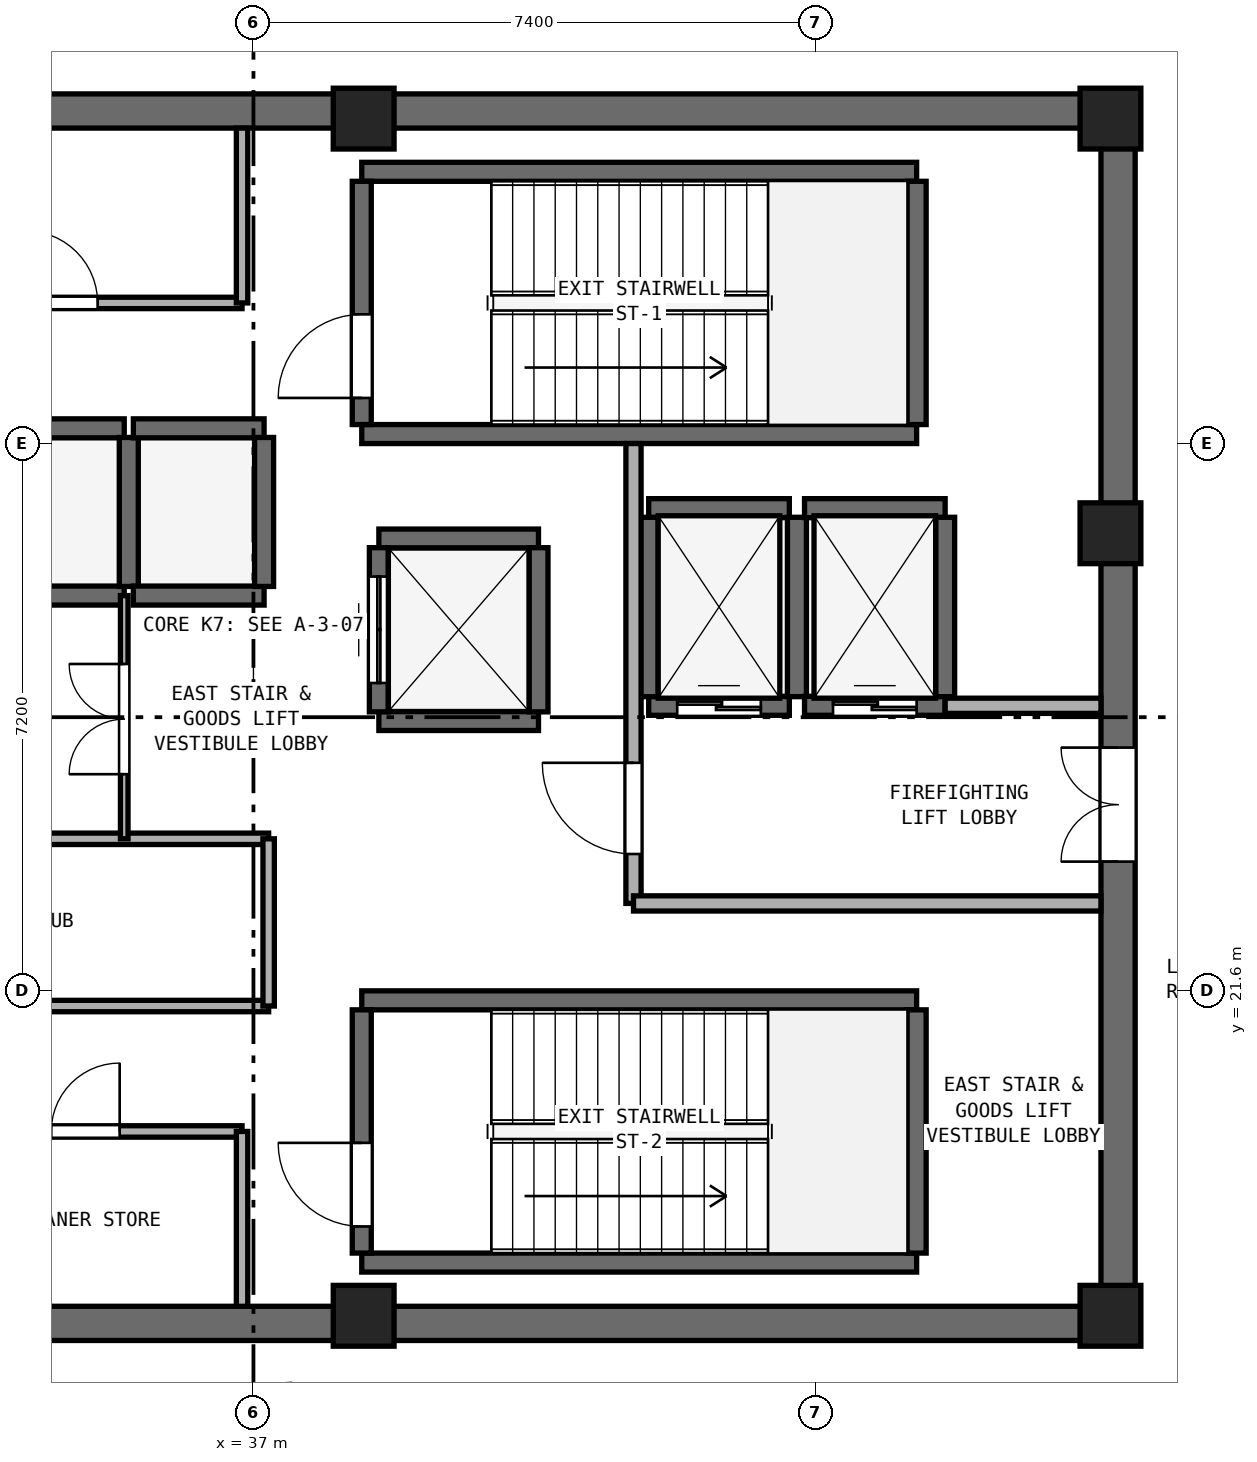
"""IFC4 building model, lengths in metres.
Left out: names, types, materials, properties, quantities, classifications, styles, units other than length and angle.
Written with IfcOpenShell. Run it as: python <this file> out.ifc"""

import sys

from ifc_helpers import new_model, si_unit, direction, frame, frame_2d, origin, origin_2d, place, context, subcontext, project, spatial, rectangle, extrude, element, fill, save


model = new_model("IFC4")
c1 = context("Model", 3, precision=1e-05, world=origin(), true_north=direction((0.0, 1.0)))
c2 = subcontext(c1, "Body", "Model", "MODEL_VIEW")
j1 = project(units=[si_unit("LENGTHUNIT", "METRE"), si_unit("PLANEANGLEUNIT", "RADIAN")], contexts=[c1])
p1 = place(None, origin())
s1 = spatial("IfcSite", under=j1, at=p1, CompositionType="ELEMENT")
p2 = place(p1, origin())
s2 = spatial("IfcBuilding", under=s1, at=p2, CompositionType="ELEMENT")
p3 = place(p2, frame((0.0, 0.0, 308.6)))
s3 = spatial("IfcBuildingStorey", under=s2, at=p3, CompositionType="ELEMENT", Elevation=308.6)
for number, where, z_axis, x_axis in (
    (1, (25.4, 17.225, 0.0), (0.0, 0.0, 1.0), (1.0, 0.0, 0.0)),
    (2, (25.4, 33.175, 0.0), (0.0, 0.0, 1.0), (1.0, 0.0, 0.0)),
):
    element("IfcWall", number, at=place(p3, frame(where, z_axis=z_axis, x_axis=x_axis)), inside=s3, PredefinedType="SHEAR", context=c2, shape_type="SweptSolid", body=[
        extrude(rectangle(XDim=23.2, YDim=0.45, at=frame_2d((11.6, 0.0))), origin(), (0.0, 0.0, 1.0), 4.52),
    ])
p4 = place(p3, frame((48.375, 17.45, 0.0), z_axis=(0.0, 0.0, 1.0), x_axis=(0.0, 1.0, 0.0)))
e3 = element("IfcWall", 3, at=p4, inside=s3, PredefinedType="SHEAR", context=c2, shape_type="SweptSolid", body=[
    extrude(rectangle(XDim=15.5, YDim=0.45, at=frame_2d((7.75, 0.0))), origin(), (0.0, 0.0, 1.0), 4.52),
])
p5 = place(p4, frame((5.85, 0.0, 0.0)))
e4 = element("IfcOpeningElement", 4, at=p5, cuts=e3, PredefinedType="OPENING", context=c2, shape_type="SweptSolid", body=[
    extrude(rectangle(XDim=1.5, YDim=2.15, at=frame_2d((0.75, 1.075))), frame((0.0, 0.235, 0.0), z_axis=(0.0, -1.0, 0.0), x_axis=(1.0, 0.0, 0.0)), (0.0, 0.0, 1.0), 0.47),
])
for number, where, z_axis, x_axis in (
    (5, (38.45, 17.325, 0.0), (0.0, 0.0, 1.0), (1.0, 0.0, 0.0)),
    (6, (48.275, 17.325, 0.0), (0.0, 0.0, 1.0), (1.0, 0.0, 0.0)),
    (7, (48.275, 27.62, 0.0), (0.0, 0.0, 1.0), (1.0, 0.0, 0.0)),
    (8, (48.275, 33.075, 0.0), (0.0, 0.0, 1.0), (1.0, 0.0, 0.0)),
    (9, (38.45, 33.075, 0.0), (0.0, 0.0, 1.0), (1.0, 0.0, 0.0)),
):
    element("IfcColumn", number, at=place(p3, frame(where, z_axis=z_axis, x_axis=x_axis)), inside=s3, PredefinedType="PILASTER", context=c2, shape_type="SweptSolid", body=[
        extrude(rectangle(XDim=0.8, YDim=0.8, at=origin_2d()), origin(), (0.0, 0.0, 1.0), 4.8),
    ])
for number, where, z_axis, x_axis in (
    (10, (38.425, 28.925, 0.0), (0.0, 0.0, 1.0), (1.0, 0.0, 0.0)),
    (11, (38.425, 32.375, 0.0), (0.0, 0.0, 1.0), (1.0, 0.0, 0.0)),
):
    element("IfcWall", number, at=place(p3, frame(where, z_axis=z_axis, x_axis=x_axis)), inside=s3, PredefinedType="SHEAR", context=c2, shape_type="SweptSolid", body=[
        extrude(rectangle(XDim=7.3, YDim=0.25, at=frame_2d((3.65, 0.0))), origin(), (0.0, 0.0, 1.0), 4.52),
    ])
p6 = place(p3, frame((38.425, 29.05, 0.0), z_axis=(0.0, 0.0, 1.0), x_axis=(0.0, 1.0, 0.0)))
e12 = element("IfcWall", 12, at=p6, inside=s3, PredefinedType="SHEAR", context=c2, shape_type="SweptSolid", body=[
    extrude(rectangle(XDim=3.2, YDim=0.25, at=frame_2d((1.6, 0.0))), origin(), (0.0, 0.0, 1.0), 4.52),
])
p7 = place(p6, frame((0.35, 0.0, 0.0)))
e13 = element("IfcOpeningElement", 13, at=p7, cuts=e12, PredefinedType="OPENING", context=c2, shape_type="SweptSolid", body=[
    extrude(rectangle(XDim=1.1, YDim=2.15, at=frame_2d((0.55, 1.075))), frame((0.0, 0.135, 0.0), z_axis=(0.0, -1.0, 0.0), x_axis=(1.0, 0.0, 0.0)), (0.0, 0.0, 1.0), 0.27),
])
p8 = place(p3, frame((45.725, 29.05, 0.0), z_axis=(0.0, 0.0, 1.0), x_axis=(0.0, 1.0, 0.0)))
e14 = element("IfcWall", 14, at=p8, inside=s3, PredefinedType="SHEAR", context=c2, shape_type="SweptSolid", body=[
    extrude(rectangle(XDim=3.2, YDim=0.25, at=frame_2d((1.6, 0.0))), origin(), (0.0, 0.0, 1.0), 4.52),
])
for number, where, z_axis, x_axis in (
    (15, (38.425, 18.025, 0.0), (0.0, 0.0, 1.0), (1.0, 0.0, 0.0)),
    (16, (38.425, 21.475, 0.0), (0.0, 0.0, 1.0), (1.0, 0.0, 0.0)),
):
    element("IfcWall", number, at=place(p3, frame(where, z_axis=z_axis, x_axis=x_axis)), inside=s3, PredefinedType="SHEAR", context=c2, shape_type="SweptSolid", body=[
        extrude(rectangle(XDim=7.3, YDim=0.25, at=frame_2d((3.65, 0.0))), origin(), (0.0, 0.0, 1.0), 4.52),
    ])
p9 = place(p3, frame((38.425, 18.15, 0.0), z_axis=(0.0, 0.0, 1.0), x_axis=(0.0, 1.0, 0.0)))
e17 = element("IfcWall", 17, at=p9, inside=s3, PredefinedType="SHEAR", context=c2, shape_type="SweptSolid", body=[
    extrude(rectangle(XDim=3.2, YDim=0.25, at=frame_2d((1.6, 0.0))), origin(), (0.0, 0.0, 1.0), 4.52),
])
p10 = place(p9, frame((0.35, 0.0, 0.0)))
e18 = element("IfcOpeningElement", 18, at=p10, cuts=e17, PredefinedType="OPENING", context=c2, shape_type="SweptSolid", body=[
    extrude(rectangle(XDim=1.1, YDim=2.15, at=frame_2d((0.55, 1.075))), frame((0.0, 0.135, 0.0), z_axis=(0.0, -1.0, 0.0), x_axis=(1.0, 0.0, 0.0)), (0.0, 0.0, 1.0), 0.27),
])
p11 = place(p3, frame((45.725, 18.15, 0.0), z_axis=(0.0, 0.0, 1.0), x_axis=(0.0, 1.0, 0.0)))
e19 = element("IfcWall", 19, at=p11, inside=s3, PredefinedType="SHEAR", context=c2, shape_type="SweptSolid", body=[
    extrude(rectangle(XDim=3.2, YDim=0.25, at=frame_2d((1.6, 0.0))), origin(), (0.0, 0.0, 1.0), 4.52),
])
for number, where, z_axis, x_axis in (
    (20, (33.58, 26.8, 0.0), (0.0, 0.0, 1.0), (1.0, 0.0, 0.0)),
    (21, (33.58, 29.0, 0.0), (0.0, 0.0, 1.0), (1.0, 0.0, 0.0)),
):
    element("IfcWall", number, at=place(p3, frame(where, z_axis=z_axis, x_axis=x_axis)), inside=s3, PredefinedType="SHEAR", context=c2, shape_type="SweptSolid", body=[
        extrude(rectangle(XDim=1.72, YDim=0.25, at=frame_2d((0.86, 0.0))), origin(), (0.0, 0.0, 1.0), 4.52),
    ])
p12 = place(p3, frame((35.36, 26.92, 0.0), z_axis=(0.0, 0.0, 1.0), x_axis=(0.0, 1.0, 0.0)))
e22 = element("IfcWall", 22, at=p12, inside=s3, PredefinedType="SHEAR", context=c2, shape_type="SweptSolid", body=[
    extrude(rectangle(XDim=1.96, YDim=0.25, at=frame_2d((0.98, 0.0))), origin(), (0.0, 0.0, 1.0), 4.52),
])
for number, where, z_axis, x_axis in (
    (23, (35.42, 26.8, 0.0), (0.0, 0.0, 1.0), (1.0, 0.0, 0.0)),
    (24, (35.42, 29.0, 0.0), (0.0, 0.0, 1.0), (1.0, 0.0, 0.0)),
):
    element("IfcWall", number, at=place(p3, frame(where, z_axis=z_axis, x_axis=x_axis)), inside=s3, PredefinedType="SHEAR", context=c2, shape_type="SweptSolid", body=[
        extrude(rectangle(XDim=1.72, YDim=0.25, at=frame_2d((0.86, 0.0))), origin(), (0.0, 0.0, 1.0), 4.52),
    ])
p13 = place(p3, frame((37.14, 26.92, 0.0), z_axis=(0.0, 0.0, 1.0), x_axis=(0.0, 1.0, 0.0)))
e25 = element("IfcWall", 25, at=p13, inside=s3, PredefinedType="SHEAR", context=c2, shape_type="SweptSolid", body=[
    extrude(rectangle(XDim=1.96, YDim=0.25, at=frame_2d((0.98, 0.0))), origin(), (0.0, 0.0, 1.0), 4.52),
])
p14 = place(p3, frame((42.2, 25.35, 0.0), z_axis=(0.0, 0.0, 1.0), x_axis=(1.0, 0.0, 0.0)))
e26 = element("IfcWall", 26, at=p14, inside=s3, PredefinedType="SHEAR", context=c2, shape_type="SweptSolid", body=[
    extrude(rectangle(XDim=1.85, YDim=0.25, at=frame_2d((0.925, 0.0))), origin(), (0.0, 0.0, 1.0), 4.52),
])
p15 = place(p14, frame((0.375, 0.0, 0.0)))
e27 = element("IfcOpeningElement", 27, at=p15, cuts=e26, PredefinedType="OPENING", context=c2, shape_type="SweptSolid", body=[
    extrude(rectangle(XDim=1.1, YDim=2.15, at=frame_2d((0.55, 1.075))), frame((0.0, 0.135, 0.0), z_axis=(0.0, -1.0, 0.0), x_axis=(1.0, 0.0, 0.0)), (0.0, 0.0, 1.0), 0.27),
])
p16 = place(p3, frame((42.2, 27.95, 0.0), z_axis=(0.0, 0.0, 1.0), x_axis=(1.0, 0.0, 0.0)))
e28 = element("IfcWall", 28, at=p16, inside=s3, PredefinedType="SHEAR", context=c2, shape_type="SweptSolid", body=[
    extrude(rectangle(XDim=1.85, YDim=0.25, at=frame_2d((0.925, 0.0))), origin(), (0.0, 0.0, 1.0), 4.52),
])
for number, where, z_axis, x_axis in (
    (29, (42.2, 25.47, 0.0), (0.0, 0.0, 1.0), (0.0, 1.0, 0.0)),
    (30, (44.15, 25.47, 0.0), (0.0, 0.0, 1.0), (0.0, 1.0, 0.0)),
):
    element("IfcWall", number, at=place(p3, frame(where, z_axis=z_axis, x_axis=x_axis)), inside=s3, PredefinedType="SHEAR", context=c2, shape_type="SweptSolid", body=[
        extrude(rectangle(XDim=2.36, YDim=0.25, at=frame_2d((1.18, 0.0))), origin(), (0.0, 0.0, 1.0), 4.52),
    ])
p17 = place(p3, frame((44.25, 25.35, 0.0), z_axis=(0.0, 0.0, 1.0), x_axis=(1.0, 0.0, 0.0)))
e31 = element("IfcWall", 31, at=p17, inside=s3, PredefinedType="SHEAR", context=c2, shape_type="SweptSolid", body=[
    extrude(rectangle(XDim=1.85, YDim=0.25, at=frame_2d((0.925, 0.0))), origin(), (0.0, 0.0, 1.0), 4.52),
])
p18 = place(p17, frame((0.375, 0.0, 0.0)))
e32 = element("IfcOpeningElement", 32, at=p18, cuts=e31, PredefinedType="OPENING", context=c2, shape_type="SweptSolid", body=[
    extrude(rectangle(XDim=1.1, YDim=2.15, at=frame_2d((0.55, 1.075))), frame((0.0, 0.135, 0.0), z_axis=(0.0, -1.0, 0.0), x_axis=(1.0, 0.0, 0.0)), (0.0, 0.0, 1.0), 0.27),
])
p19 = place(p3, frame((44.25, 27.95, 0.0), z_axis=(0.0, 0.0, 1.0), x_axis=(1.0, 0.0, 0.0)))
e33 = element("IfcWall", 33, at=p19, inside=s3, PredefinedType="SHEAR", context=c2, shape_type="SweptSolid", body=[
    extrude(rectangle(XDim=1.85, YDim=0.25, at=frame_2d((0.925, 0.0))), origin(), (0.0, 0.0, 1.0), 4.52),
])
p20 = place(p3, frame((46.1, 25.47, 0.0), z_axis=(0.0, 0.0, 1.0), x_axis=(0.0, 1.0, 0.0)))
e34 = element("IfcWall", 34, at=p20, inside=s3, PredefinedType="SHEAR", context=c2, shape_type="SweptSolid", body=[
    extrude(rectangle(XDim=2.36, YDim=0.25, at=frame_2d((1.18, 0.0))), origin(), (0.0, 0.0, 1.0), 4.52),
])
for number, where, z_axis, x_axis in (
    (35, (38.65, 25.15, 0.0), (0.0, 0.0, 1.0), (1.0, 0.0, 0.0)),
    (36, (38.65, 27.55, 0.0), (0.0, 0.0, 1.0), (1.0, 0.0, 0.0)),
):
    element("IfcWall", number, at=place(p3, frame(where, z_axis=z_axis, x_axis=x_axis)), inside=s3, PredefinedType="SHEAR", context=c2, shape_type="SweptSolid", body=[
        extrude(rectangle(XDim=2.1, YDim=0.25, at=frame_2d((1.05, 0.0))), origin(), (0.0, 0.0, 1.0), 4.52),
    ])
p21 = place(p3, frame((38.65, 25.27, 0.0), z_axis=(0.0, 0.0, 1.0), x_axis=(0.0, 1.0, 0.0)))
e37 = element("IfcWall", 37, at=p21, inside=s3, PredefinedType="SHEAR", context=c2, shape_type="SweptSolid", body=[
    extrude(rectangle(XDim=2.16, YDim=0.25, at=frame_2d((1.08, 0.0))), origin(), (0.0, 0.0, 1.0), 4.52),
])
p22 = place(p21, frame((0.38, 0.0, 0.0)))
e38 = element("IfcOpeningElement", 38, at=p22, cuts=e37, PredefinedType="OPENING", context=c2, shape_type="SweptSolid", body=[
    extrude(rectangle(XDim=1.4, YDim=2.2, at=frame_2d((0.7, 1.1))), frame((0.0, 0.135, 0.0), z_axis=(0.0, -1.0, 0.0), x_axis=(1.0, 0.0, 0.0)), (0.0, 0.0, 1.0), 0.27),
])
p23 = place(p3, frame((40.75, 25.27, 0.0), z_axis=(0.0, 0.0, 1.0), x_axis=(0.0, 1.0, 0.0)))
e39 = element("IfcWall", 39, at=p23, inside=s3, PredefinedType="SHEAR", context=c2, shape_type="SweptSolid", body=[
    extrude(rectangle(XDim=2.16, YDim=0.25, at=frame_2d((1.08, 0.0))), origin(), (0.0, 0.0, 1.0), 4.52),
])
p24 = place(p3, frame((42.0, 22.75, 0.0), z_axis=(0.0, 0.0, 1.0), x_axis=(0.0, 1.0, 0.0)))
e40 = element("IfcWall", 40, at=p24, inside=s3, PredefinedType="SOLIDWALL", context=c2, shape_type="SweptSolid", body=[
    extrude(rectangle(XDim=6.05, YDim=0.2, at=frame_2d((3.025, 0.0))), origin(), (0.0, 0.0, 1.0), 4.52),
])
p25 = place(p24, frame((0.65, 0.0, 0.0)))
e41 = element("IfcOpeningElement", 41, at=p25, cuts=e40, PredefinedType="OPENING", context=c2, shape_type="SweptSolid", body=[
    extrude(rectangle(XDim=1.2, YDim=2.15, at=frame_2d((0.6, 1.075))), frame((0.0, 0.11, 0.0), z_axis=(0.0, -1.0, 0.0), x_axis=(1.0, 0.0, 0.0)), (0.0, 0.0, 1.0), 0.22),
])
p26 = place(p3, frame((42.0, 22.75, 0.0), z_axis=(0.0, 0.0, 1.0), x_axis=(1.0, 0.0, 0.0)))
e42 = element("IfcWall", 42, at=p26, inside=s3, PredefinedType="SOLIDWALL", context=c2, shape_type="SweptSolid", body=[
    extrude(rectangle(XDim=6.15, YDim=0.2, at=frame_2d((3.075, 0.0))), origin(), (0.0, 0.0, 1.0), 4.52),
])
p27 = place(p3, frame((46.1, 25.35, 0.0), z_axis=(0.0, 0.0, 1.0), x_axis=(1.0, 0.0, 0.0)))
e43 = element("IfcWall", 43, at=p27, inside=s3, PredefinedType="SOLIDWALL", context=c2, shape_type="SweptSolid", body=[
    extrude(rectangle(XDim=2.05, YDim=0.2, at=frame_2d((1.025, 0.0))), origin(), (0.0, 0.0, 1.0), 4.52),
])
p28 = place(p3, frame((32.1, 30.65, 0.0), z_axis=(0.0, 0.0, 1.0), x_axis=(1.0, 0.0, 0.0)))
e44 = element("IfcWall", 44, at=p28, inside=s3, PredefinedType="PARTITIONING", context=c2, shape_type="SweptSolid", body=[
    extrude(rectangle(XDim=4.75, YDim=0.15, at=frame_2d((2.375, 0.0))), origin(), (0.0, 0.0, 1.0), 4.52),
])
p29 = place(p28, frame((1.9, 0.0, 0.0)))
e45 = element("IfcOpeningElement", 45, at=p29, cuts=e44, PredefinedType="OPENING", context=c2, shape_type="SweptSolid", body=[
    extrude(rectangle(XDim=0.95, YDim=2.1, at=frame_2d((0.475, 1.05))), frame((0.0, 0.085, 0.0), z_axis=(0.0, -1.0, 0.0), x_axis=(1.0, 0.0, 0.0)), (0.0, 0.0, 1.0), 0.17),
])
p30 = place(p3, frame((36.85, 30.65, 0.0), z_axis=(0.0, 0.0, 1.0), x_axis=(0.0, 1.0, 0.0)))
e46 = element("IfcWall", 46, at=p30, inside=s3, PredefinedType="PARTITIONING", context=c2, shape_type="SweptSolid", body=[
    extrude(rectangle(XDim=2.3, YDim=0.15, at=frame_2d((1.15, 0.0))), origin(), (0.0, 0.0, 1.0), 4.52),
])
p31 = place(p3, frame((32.73, 19.75, 0.0), z_axis=(0.0, 0.0, 1.0), x_axis=(1.0, 0.0, 0.0)))
e47 = element("IfcWall", 47, at=p31, inside=s3, PredefinedType="PARTITIONING", context=c2, shape_type="SweptSolid", body=[
    extrude(rectangle(XDim=4.12, YDim=0.15, at=frame_2d((2.06, 0.0))), origin(), (0.0, 0.0, 1.0), 4.52),
])
p32 = place(p31, frame((1.61, 0.0, 0.0)))
e48 = element("IfcOpeningElement", 48, at=p32, cuts=e47, PredefinedType="OPENING", context=c2, shape_type="SweptSolid", body=[
    extrude(rectangle(XDim=0.9, YDim=2.1, at=frame_2d((0.45, 1.05))), frame((0.0, 0.085, 0.0), z_axis=(0.0, -1.0, 0.0), x_axis=(1.0, 0.0, 0.0)), (0.0, 0.0, 1.0), 0.17),
])
p33 = place(p3, frame((36.85, 17.45, 0.0), z_axis=(0.0, 0.0, 1.0), x_axis=(0.0, 1.0, 0.0)))
e49 = element("IfcWall", 49, at=p33, inside=s3, PredefinedType="PARTITIONING", context=c2, shape_type="SweptSolid", body=[
    extrude(rectangle(XDim=2.3, YDim=0.15, at=frame_2d((1.15, 0.0))), origin(), (0.0, 0.0, 1.0), 4.52),
])
p34 = place(p3, frame((30.08, 21.4, 0.0), z_axis=(0.0, 0.0, 1.0), x_axis=(1.0, 0.0, 0.0)))
e50 = element("IfcWall", 50, at=p34, inside=s3, PredefinedType="PARTITIONING", context=c2, shape_type="SweptSolid", body=[
    extrude(rectangle(XDim=7.12, YDim=0.15, at=frame_2d((3.56, 0.0))), origin(), (0.0, 0.0, 1.0), 4.52),
])
p35 = place(p3, frame((30.08, 23.6, 0.0), z_axis=(0.0, 0.0, 1.0), x_axis=(1.0, 0.0, 0.0)))
e51 = element("IfcWall", 51, at=p35, inside=s3, PredefinedType="PARTITIONING", context=c2, shape_type="SweptSolid", body=[
    extrude(rectangle(XDim=7.12, YDim=0.15, at=frame_2d((3.56, 0.0))), origin(), (0.0, 0.0, 1.0), 4.52),
])
p36 = place(p35, frame((3.11, 0.0, 0.0)))
e52 = element("IfcOpeningElement", 52, at=p36, cuts=e51, PredefinedType="OPENING", context=c2, shape_type="SweptSolid", body=[
    extrude(rectangle(XDim=0.9, YDim=2.1, at=frame_2d((0.45, 1.05))), frame((0.0, 0.085, 0.0), z_axis=(0.0, -1.0, 0.0), x_axis=(1.0, 0.0, 0.0)), (0.0, 0.0, 1.0), 0.17),
])
p37 = place(p3, frame((37.2, 21.4, 0.0), z_axis=(0.0, 0.0, 1.0), x_axis=(0.0, 1.0, 0.0)))
e53 = element("IfcWall", 53, at=p37, inside=s3, PredefinedType="PARTITIONING", context=c2, shape_type="SweptSolid", body=[
    extrude(rectangle(XDim=2.2, YDim=0.15, at=frame_2d((1.1, 0.0))), origin(), (0.0, 0.0, 1.0), 4.52),
])
p38 = place(p3, frame((35.3, 23.6, 0.0), z_axis=(0.0, 0.0, 1.0), x_axis=(0.0, 1.0, 0.0)))
e54 = element("IfcWall", 54, at=p38, inside=s3, PredefinedType="PARTITIONING", context=c2, shape_type="SweptSolid", body=[
    extrude(rectangle(XDim=3.2, YDim=0.1, at=frame_2d((1.6, 0.0))), origin(), (0.0, 0.0, 1.0), 4.52),
])
p39 = place(p38, frame((0.85, 0.0, 0.0)))
e55 = element("IfcOpeningElement", 55, at=p39, cuts=e54, PredefinedType="OPENING", context=c2, shape_type="SweptSolid", body=[
    extrude(rectangle(XDim=1.45, YDim=2.12, at=frame_2d((0.725, 1.06))), frame((0.0, 0.06, 0.0), z_axis=(0.0, -1.0, 0.0), x_axis=(1.0, 0.0, 0.0)), (0.0, 0.0, 1.0), 0.12),
])
p40 = place(p7, origin())
e56 = element("IfcDoor", 56, at=p40, inside=s3, OperationType="SINGLE_SWING_LEFT", PredefinedType="DOOR", context=c2, shape_type="SweptSolid", body=[
    extrude(rectangle(XDim=1.1, YDim=2.15, at=frame_2d((0.55, 1.075))), frame((0.0, 0.025, 0.0), z_axis=(0.0, -1.0, 0.0), x_axis=(1.0, 0.0, 0.0)), (0.0, 0.0, 1.0), 0.05),
])
fill(e13, e56)
p41 = place(p10, origin())
e57 = element("IfcDoor", 57, at=p41, inside=s3, OperationType="SINGLE_SWING_RIGHT", PredefinedType="DOOR", context=c2, shape_type="SweptSolid", body=[
    extrude(rectangle(XDim=1.1, YDim=2.15, at=frame_2d((0.55, 1.075))), frame((0.0, 0.025, 0.0), z_axis=(0.0, -1.0, 0.0), x_axis=(1.0, 0.0, 0.0)), (0.0, 0.0, 1.0), 0.05),
])
fill(e18, e57)
p42 = place(p15, origin())
e58 = element("IfcDoor", 58, at=p42, inside=s3, OperationType="DOUBLE_DOOR_SLIDING", PredefinedType="DOOR", context=c2, shape_type="SweptSolid", body=[
    extrude(rectangle(XDim=1.1, YDim=2.15, at=frame_2d((0.55, 1.075))), frame((0.0, 0.025, 0.0), z_axis=(0.0, -1.0, 0.0), x_axis=(1.0, 0.0, 0.0)), (0.0, 0.0, 1.0), 0.05),
])
fill(e27, e58)
p43 = place(p18, origin())
e59 = element("IfcDoor", 59, at=p43, inside=s3, OperationType="DOUBLE_DOOR_SLIDING", PredefinedType="DOOR", context=c2, shape_type="SweptSolid", body=[
    extrude(rectangle(XDim=1.1, YDim=2.15, at=frame_2d((0.55, 1.075))), frame((0.0, 0.025, 0.0), z_axis=(0.0, -1.0, 0.0), x_axis=(1.0, 0.0, 0.0)), (0.0, 0.0, 1.0), 0.05),
])
fill(e32, e59)
p44 = place(p22, origin())
e60 = element("IfcDoor", 60, at=p44, inside=s3, OperationType="DOUBLE_DOOR_SLIDING", PredefinedType="DOOR", context=c2, shape_type="SweptSolid", body=[
    extrude(rectangle(XDim=1.4, YDim=2.2, at=frame_2d((0.7, 1.1))), frame((0.0, 0.025, 0.0), z_axis=(0.0, -1.0, 0.0), x_axis=(1.0, 0.0, 0.0)), (0.0, 0.0, 1.0), 0.05),
])
fill(e38, e60)
p45 = place(p25, origin())
e61 = element("IfcDoor", 61, at=p45, inside=s3, OperationType="SINGLE_SWING_RIGHT", PredefinedType="DOOR", context=c2, shape_type="SweptSolid", body=[
    extrude(rectangle(XDim=1.2, YDim=2.15, at=frame_2d((0.6, 1.075))), frame((0.0, 0.025, 0.0), z_axis=(0.0, -1.0, 0.0), x_axis=(1.0, 0.0, 0.0)), (0.0, 0.0, 1.0), 0.05),
])
fill(e41, e61)
p46 = place(p5, origin())
e62 = element("IfcDoor", 62, at=p46, inside=s3, OperationType="DOUBLE_DOOR_SINGLE_SWING", PredefinedType="DOOR", context=c2, shape_type="SweptSolid", body=[
    extrude(rectangle(XDim=1.5, YDim=2.15, at=frame_2d((0.75, 1.075))), frame((0.0, 0.025, 0.0), z_axis=(0.0, -1.0, 0.0), x_axis=(1.0, 0.0, 0.0)), (0.0, 0.0, 1.0), 0.05),
])
fill(e4, e62)
p47 = place(p29, origin())
e63 = element("IfcDoor", 63, at=p47, inside=s3, OperationType="SINGLE_SWING_LEFT", PredefinedType="DOOR", context=c2, shape_type="SweptSolid", body=[
    extrude(rectangle(XDim=0.95, YDim=2.1, at=frame_2d((0.475, 1.05))), frame((0.0, 0.025, 0.0), z_axis=(0.0, -1.0, 0.0), x_axis=(1.0, 0.0, 0.0)), (0.0, 0.0, 1.0), 0.05),
])
fill(e45, e63)
p48 = place(p32, origin())
e64 = element("IfcDoor", 64, at=p48, inside=s3, OperationType="SINGLE_SWING_RIGHT", PredefinedType="DOOR", context=c2, shape_type="SweptSolid", body=[
    extrude(rectangle(XDim=0.9, YDim=2.1, at=frame_2d((0.45, 1.05))), frame((0.0, 0.025, 0.0), z_axis=(0.0, -1.0, 0.0), x_axis=(1.0, 0.0, 0.0)), (0.0, 0.0, 1.0), 0.05),
])
fill(e48, e64)
p49 = place(p39, origin())
e65 = element("IfcDoor", 65, at=p49, inside=s3, OperationType="DOUBLE_DOOR_SINGLE_SWING", PredefinedType="DOOR", context=c2, shape_type="SweptSolid", body=[
    extrude(rectangle(XDim=1.45, YDim=2.12, at=frame_2d((0.725, 1.06))), frame((0.0, 0.025, 0.0), z_axis=(0.0, -1.0, 0.0), x_axis=(1.0, 0.0, 0.0)), (0.0, 0.0, 1.0), 0.05),
])
fill(e55, e65)
save(model, sys.argv[1])
